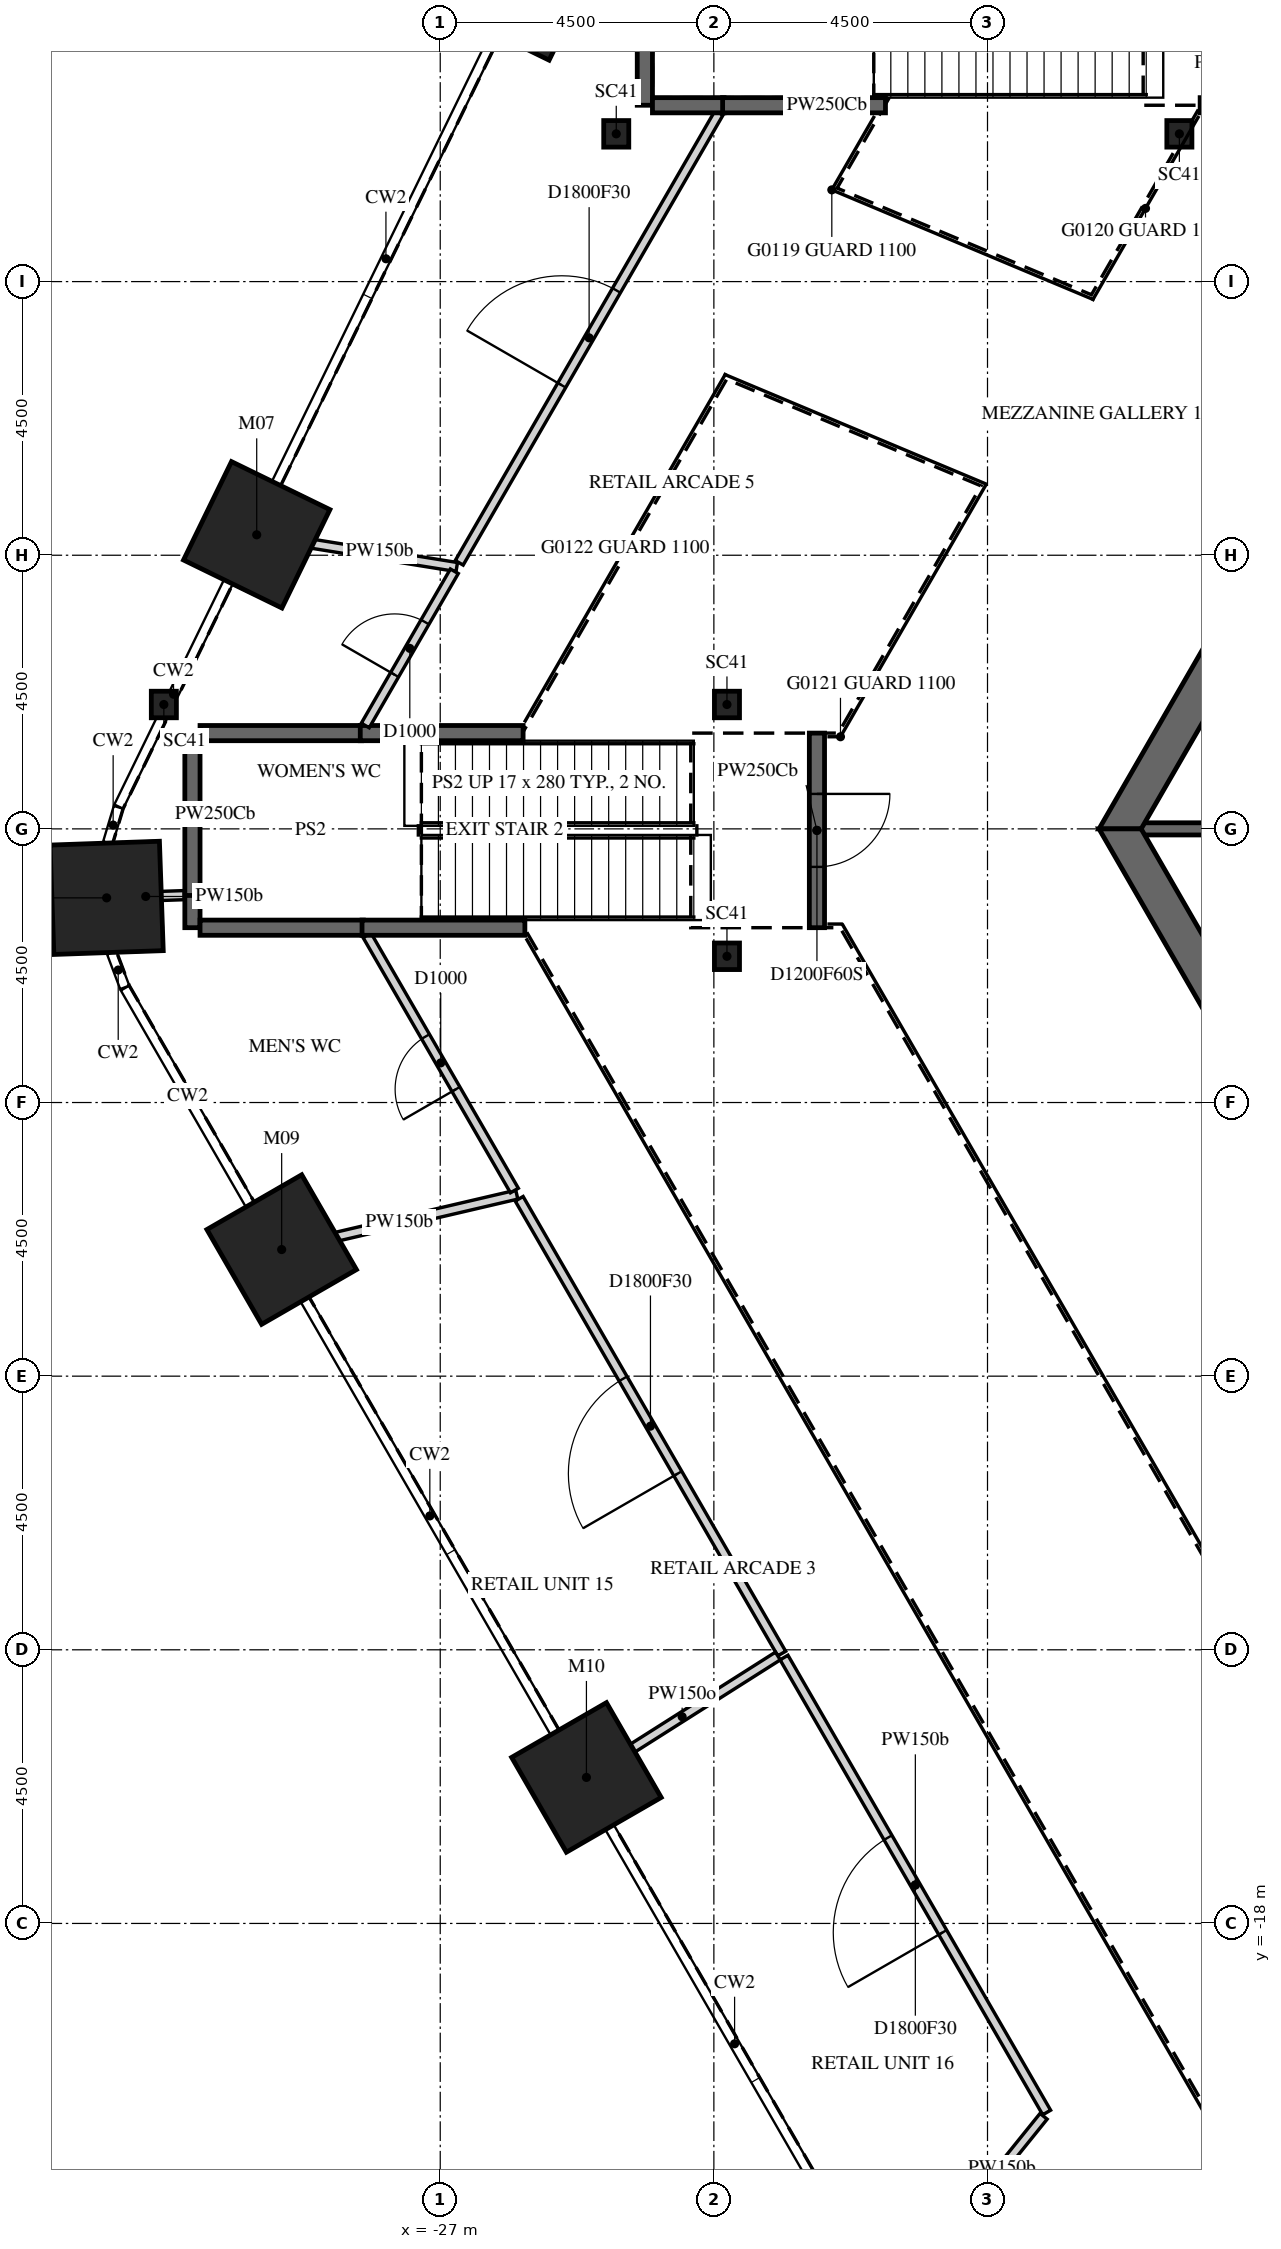
"""IFC4 building model, lengths in metres.
Left out: names, types, materials, properties, quantities, classifications, styles, units other than length and angle.
Written with IfcOpenShell. Run it as: python <this file> out.ifc"""

import sys

from ifc_helpers import new_model, si_unit, direction, frame, frame_2d, origin, origin_2d, place, context, subcontext, project, spatial, polyline, rectangle, i_section, outline, extrude, element, fill, save


model = new_model("IFC4")
c1 = context("Model", 3, precision=1e-05, world=origin(), true_north=direction((0.0, 1.0)))
c2 = subcontext(c1, "Body", "Model", "MODEL_VIEW")
j1 = project(units=[si_unit("LENGTHUNIT", "METRE"), si_unit("PLANEANGLEUNIT", "RADIAN")], contexts=[c1])
p1 = place(None, origin())
s1 = spatial("IfcSite", under=j1, at=p1, CompositionType="ELEMENT")
p2 = place(p1, origin())
s2 = spatial("IfcBuilding", under=s1, at=p2, CompositionType="ELEMENT")
p3 = place(p2, frame((0.0, 0.0, 9.0)))
s3 = spatial("IfcBuildingStorey", under=s2, at=p3, CompositionType="ELEMENT", Elevation=9.0)
for number, where, z_axis, x_axis in (
    (1, (-25.624, 13.845, -0.25), (0.0, 0.0, 1.0), (0.438, 0.899, 0.0)),
    (2, (-30.018, 4.836, -0.25), (0.0, 0.0, 1.0), (0.438, 0.899, 0.0)),
    (3, (-32.486, -1.135, -0.25), (0.0, 0.0, 1.0), (-0.035, 0.999, 0.0)),
    (4, (-29.608, -6.918, -0.25), (0.0, 0.0, 1.0), (-0.5, 0.866, 0.0)),
    (5, (-24.596, -15.599, -0.25), (0.0, 0.0, 1.0), (-0.5, 0.866, 0.0)),
):
    element("IfcColumn", number, at=place(p3, frame(where, z_axis=z_axis, x_axis=x_axis)), inside=s3, PredefinedType="COLUMN", context=c2, shape_type="SweptSolid", body=[
        extrude(rectangle(XDim=1.8, YDim=1.8, at=origin_2d()), origin(), (0.0, 0.0, 1.0), 6.0),
    ])
for number, where, z_axis, x_axis in (
    (6, (-31.545, 2.045, -0.25), (0.0, 0.0, 1.0), (1.0, 0.0, 0.0)),
    (7, (-22.285, 2.045, -0.25), (0.0, 0.0, 1.0), (1.0, 0.0, 0.0)),
    (8, (-22.285, -2.095, -0.25), (0.0, 0.0, 1.0), (1.0, 0.0, 0.0)),
    (9, (-24.105, 11.43, -0.25), (0.0, 0.0, 1.0), (1.0, 0.0, 0.0)),
    (10, (-14.845, 11.43, -0.25), (0.0, 0.0, 1.0), (1.0, 0.0, 0.0)),
):
    element("IfcColumn", number, at=place(p3, frame(where, z_axis=z_axis, x_axis=x_axis)), inside=s3, PredefinedType="COLUMN", context=c2, shape_type="SweptSolid", body=[
        extrude(i_section(OverallWidth=0.412, OverallDepth=0.437, WebThickness=0.036, FlangeThickness=0.058, FilletRadius=0.015, at=origin_2d()), origin(), (0.0, 0.0, 1.0), 6.0),
    ])
p4 = place(p3, frame((-7.91, 13.7, -0.25), z_axis=(0.0, 0.0, 1.0), x_axis=(-0.499999880136, -0.866025472988, 0.0)))
e11 = element("IfcWall", 11, at=p4, inside=s3, PredefinedType="SHEAR", context=c2, shape_type="SweptSolid", body=[
    extrude(outline(polyline([(-0.173, -0.3), (15.993, -0.3), (15.646, 0.3), (0.173, 0.3), (-0.173, -0.3)])), origin(), (0.0, 0.0, 1.0), 6.0),
])
p5 = place(p4, frame((7.039, 0.0, 0.25)))
e12 = element("IfcOpeningElement", 12, at=p5, cuts=e11, PredefinedType="OPENING", context=c2, shape_type="SweptSolid", body=[
    extrude(rectangle(XDim=1.8, YDim=2.4, at=frame_2d((0.9, 1.2))), frame((0.0, 0.31, 0.0), z_axis=(0.0, -1.0, 0.0), x_axis=(1.0, 0.0, 0.0)), (0.0, 0.0, 1.0), 0.62),
])
p6 = place(p3, frame((-15.819, 0.0, -0.25), z_axis=(0.0, 0.0, 1.0), x_axis=(0.499999880136, -0.866025472988, 0.0)))
e13 = element("IfcWall", 13, at=p6, inside=s3, PredefinedType="SHEAR", context=c2, shape_type="SweptSolid", body=[
    extrude(outline(polyline([(-0.173, -0.3), (15.993, -0.3), (15.646, 0.3), (0.173, 0.3), (-0.173, -0.3)])), origin(), (0.0, 0.0, 1.0), 6.0),
])
p7 = place(p6, frame((6.981, 0.0, 0.25)))
e14 = element("IfcOpeningElement", 14, at=p7, cuts=e13, PredefinedType="OPENING", context=c2, shape_type="SweptSolid", body=[
    extrude(rectangle(XDim=1.8, YDim=2.4, at=frame_2d((0.9, 1.2))), frame((0.0, 0.31, 0.0), z_axis=(0.0, -1.0, 0.0), x_axis=(1.0, 0.0, 0.0)), (0.0, 0.0, 1.0), 0.62),
])
p8 = place(p3, frame((-11.547, 0.0, -0.25), z_axis=(0.0, 0.0, 1.0), x_axis=(-1.0, 0.0, 0.0)))
e15 = element("IfcWall", 15, at=p8, inside=s3, PredefinedType="SHEAR", context=c2, shape_type="SweptSolid", body=[
    extrude(rectangle(XDim=3.926, YDim=0.2, at=frame_2d((1.963, 0.0))), origin(), (0.0, 0.0, 1.0), 6.0),
])
p9 = place(p3, frame((-32.486, -1.134, 0.0), z_axis=(0.0, 0.0, 1.0), x_axis=(0.99939717978, 0.034717100209, 0.0)))
e16 = element("IfcWall", 16, at=p9, inside=s3, PredefinedType="PARTITIONING", context=c2, shape_type="SweptSolid", body=[
    extrude(rectangle(XDim=1.287, YDim=0.15, at=frame_2d((0.644, 0.0))), origin(), (0.0, 0.0, 1.0), 5.75),
])
p10 = place(p3, frame((-31.075, -1.625, 0.0), z_axis=(0.0, 0.0, 1.0), x_axis=(0.0, 1.0, 0.0)))
e17 = element("IfcWall", 17, at=p10, inside=s3, PredefinedType="PARTITIONING", context=c2, shape_type="SweptSolid", body=[
    extrude(rectangle(XDim=0.55, YDim=0.25, at=frame_2d((0.275, 0.0))), origin(), (0.0, 0.0, 1.0), 5.75),
])
p11 = place(p3, frame((-31.075, -1.095, 0.0), z_axis=(0.0, 0.0, 1.0), x_axis=(0.0, 1.0, 0.0)))
e18 = element("IfcWall", 18, at=p11, inside=s3, PredefinedType="PARTITIONING", context=c2, shape_type="SweptSolid", body=[
    extrude(rectangle(XDim=2.67, YDim=0.25, at=frame_2d((1.335, 0.0))), origin(), (0.0, 0.0, 1.0), 5.75),
])
p12 = place(p3, frame((-30.95, 1.575, 0.0), z_axis=(0.0, 0.0, 1.0), x_axis=(1.0, 0.0, 0.0)))
e19 = element("IfcWall", 19, at=p12, inside=s3, PredefinedType="PARTITIONING", context=c2, shape_type="SweptSolid", body=[
    extrude(rectangle(XDim=2.657, YDim=0.25, at=frame_2d((1.329, 0.0))), origin(), (0.0, 0.0, 1.0), 5.75),
])
p13 = place(p3, frame((-30.018, 4.836, 0.0), z_axis=(0.0, 0.0, 1.0), x_axis=(0.987270453079, -0.159050471478, 0.0)))
e20 = element("IfcWall", 20, at=p13, inside=s3, PredefinedType="PARTITIONING", context=c2, shape_type="SweptSolid", body=[
    extrude(rectangle(XDim=3.333, YDim=0.15, at=frame_2d((1.666, 0.0))), origin(), (0.0, 0.0, 1.0), 5.75),
])
p14 = place(p3, frame((-29.608, -6.918, 0.0), z_axis=(0.0, 0.0, 1.0), x_axis=(0.97379720247, 0.227418135737, 0.0)))
e21 = element("IfcWall", 21, at=p14, inside=s3, PredefinedType="PARTITIONING", context=c2, shape_type="SweptSolid", body=[
    extrude(rectangle(XDim=3.971, YDim=0.15, at=frame_2d((1.985, 0.0))), origin(), (0.0, 0.0, 1.0), 5.75),
])
p15 = place(p3, frame((-28.315, 1.575, 0.0), z_axis=(0.0, 0.0, 1.0), x_axis=(1.0, 0.0, 0.0)))
e22 = element("IfcWall", 22, at=p15, inside=s3, PredefinedType="PARTITIONING", context=c2, shape_type="SweptSolid", body=[
    extrude(rectangle(XDim=2.678, YDim=0.25, at=frame_2d((1.339, 0.0))), origin(), (0.0, 0.0, 1.0), 5.75),
])
p16 = place(p3, frame((-25.78, -5.947, 0.0), z_axis=(0.0, 0.0, 1.0), x_axis=(-0.500066928074, 0.865986759395, 0.0)))
e23 = element("IfcWall", 23, at=p16, inside=s3, PredefinedType="PARTITIONING", context=c2, shape_type="SweptSolid", body=[
    extrude(rectangle(XDim=4.846, YDim=0.15, at=frame_2d((2.423, 0.0))), origin(), (0.0, 0.0, 1.0), 5.75),
])
p17 = place(p16, frame((1.923, 0.0, 0.0)))
e24 = element("IfcOpeningElement", 24, at=p17, cuts=e23, PredefinedType="OPENING", context=c2, shape_type="SweptSolid", body=[
    extrude(rectangle(XDim=1.0, YDim=2.1, at=frame_2d((0.5, 1.05))), frame((0.0, 0.085, 0.0), z_axis=(0.0, -1.0, 0.0), x_axis=(1.0, 0.0, 0.0)), (0.0, 0.0, 1.0), 0.17),
])
p18 = place(p3, frame((-28.264, -1.625, 0.0), z_axis=(0.0, 0.0, 1.0), x_axis=(-1.0, 0.0, 0.0)))
e25 = element("IfcWall", 25, at=p18, inside=s3, PredefinedType="PARTITIONING", context=c2, shape_type="SweptSolid", body=[
    extrude(rectangle(XDim=2.686, YDim=0.25, at=frame_2d((1.343, 0.0))), origin(), (0.0, 0.0, 1.0), 5.75),
])
p19 = place(p3, frame((-28.233, 1.7, 0.0), z_axis=(0.0, 0.0, 1.0), x_axis=(0.500083180475, 0.865977374189, 0.0)))
e26 = element("IfcWall", 26, at=p19, inside=s3, PredefinedType="PARTITIONING", context=c2, shape_type="SweptSolid", body=[
    extrude(rectangle(XDim=2.929, YDim=0.15, at=frame_2d((1.465, 0.0))), origin(), (0.0, 0.0, 1.0), 5.75),
])
p20 = place(p19, frame((0.965, 0.0, 0.0)))
e27 = element("IfcOpeningElement", 27, at=p20, cuts=e26, PredefinedType="OPENING", context=c2, shape_type="SweptSolid", body=[
    extrude(rectangle(XDim=1.0, YDim=2.1, at=frame_2d((0.5, 1.05))), frame((0.0, 0.085, 0.0), z_axis=(0.0, -1.0, 0.0), x_axis=(1.0, 0.0, 0.0)), (0.0, 0.0, 1.0), 0.17),
])
p21 = place(p3, frame((-21.384, -13.562, 0.0), z_axis=(0.0, 0.0, 1.0), x_axis=(-0.499976136806, 0.866039180768, 0.0)))
e28 = element("IfcWall", 28, at=p21, inside=s3, PredefinedType="PARTITIONING", context=c2, shape_type="SweptSolid", body=[
    extrude(rectangle(XDim=8.636, YDim=0.15, at=frame_2d((4.318, 0.0))), origin(), (0.0, 0.0, 1.0), 5.75),
])
p22 = place(p21, frame((3.418, 0.0, 0.0)))
e29 = element("IfcOpeningElement", 29, at=p22, cuts=e28, PredefinedType="OPENING", context=c2, shape_type="SweptSolid", body=[
    extrude(rectangle(XDim=1.8, YDim=2.1, at=frame_2d((0.9, 1.05))), frame((0.0, 0.085, 0.0), z_axis=(0.0, -1.0, 0.0), x_axis=(1.0, 0.0, 0.0)), (0.0, 0.0, 1.0), 0.17),
])
p23 = place(p3, frame((-25.608, -1.625, 0.0), z_axis=(0.0, 0.0, 1.0), x_axis=(-1.0, 0.0, 0.0)))
e30 = element("IfcWall", 30, at=p23, inside=s3, PredefinedType="PARTITIONING", context=c2, shape_type="SweptSolid", body=[
    extrude(rectangle(XDim=2.678, YDim=0.25, at=frame_2d((1.339, 0.0))), origin(), (0.0, 0.0, 1.0), 5.75),
])
p24 = place(p3, frame((-24.596, -15.599, 0.0), z_axis=(0.0, 0.0, 1.0), x_axis=(0.84447751604, 0.535591005249, 0.0)))
e31 = element("IfcWall", 31, at=p24, inside=s3, PredefinedType="PARTITIONING", context=c2, shape_type="SweptSolid", body=[
    extrude(rectangle(XDim=3.728, YDim=0.15, at=frame_2d((1.864, 0.0))), origin(), (0.0, 0.0, 1.0), 4.996),
])
p25 = place(p3, frame((-23.635, 11.9, 0.0), z_axis=(0.0, 0.0, 1.0), x_axis=(0.0, 1.0, 0.0)))
e32 = element("IfcWall", 32, at=p25, inside=s3, PredefinedType="PARTITIONING", context=c2, shape_type="SweptSolid", body=[
    extrude(rectangle(XDim=3.2, YDim=0.25, at=frame_2d((1.6, 0.0))), origin(), (0.0, 0.0, 1.0), 5.75),
])
p26 = place(p3, frame((-26.688, 4.375, 0.0), z_axis=(0.0, 0.0, 1.0), x_axis=(0.500057174496, 0.865992391557, 0.0)))
e33 = element("IfcWall", 33, at=p26, inside=s3, PredefinedType="PARTITIONING", context=c2, shape_type="SweptSolid", body=[
    extrude(rectangle(XDim=8.544, YDim=0.15, at=frame_2d((4.272, 0.0))), origin(), (0.0, 0.0, 1.0), 5.75),
])
p27 = place(p26, frame((3.372, 0.0, 0.0)))
e34 = element("IfcOpeningElement", 34, at=p27, cuts=e33, PredefinedType="OPENING", context=c2, shape_type="SweptSolid", body=[
    extrude(rectangle(XDim=1.8, YDim=2.1, at=frame_2d((0.9, 1.05))), frame((0.0, 0.085, 0.0), z_axis=(0.0, -1.0, 0.0), x_axis=(1.0, 0.0, 0.0)), (0.0, 0.0, 1.0), 0.17),
])
p28 = place(p3, frame((-22.333, 11.9, 0.0), z_axis=(0.0, 0.0, 1.0), x_axis=(-1.0, 0.0, 0.0)))
e35 = element("IfcWall", 35, at=p28, inside=s3, PredefinedType="PARTITIONING", context=c2, shape_type="SweptSolid", body=[
    extrude(rectangle(XDim=1.177, YDim=0.25, at=frame_2d((0.588, 0.0))), origin(), (0.0, 0.0, 1.0), 5.75),
])
p29 = place(p3, frame((-17.027, -21.109, 0.0), z_axis=(0.0, 0.0, 1.0), x_axis=(-0.499968708895, 0.866043468958, 0.0)))
e36 = element("IfcWall", 36, at=p29, inside=s3, PredefinedType="PARTITIONING", context=c2, shape_type="SweptSolid", body=[
    extrude(rectangle(XDim=8.639, YDim=0.15, at=frame_2d((4.32, 0.0))), origin(), (0.0, 0.0, 1.0), 5.75),
])
p30 = place(p29, frame((3.42, 0.0, 0.0)))
e37 = element("IfcOpeningElement", 37, at=p30, cuts=e36, PredefinedType="OPENING", context=c2, shape_type="SweptSolid", body=[
    extrude(rectangle(XDim=1.8, YDim=2.1, at=frame_2d((0.9, 1.05))), frame((0.0, 0.085, 0.0), z_axis=(0.0, -1.0, 0.0), x_axis=(1.0, 0.0, 0.0)), (0.0, 0.0, 1.0), 0.17),
])
p31 = place(p3, frame((-20.805, 1.575, 0.0), z_axis=(0.0, 0.0, 1.0), x_axis=(0.0, -1.0, 0.0)))
e38 = element("IfcWall", 38, at=p31, inside=s3, PredefinedType="PARTITIONING", context=c2, shape_type="SweptSolid", body=[
    extrude(rectangle(XDim=3.2, YDim=0.25, at=frame_2d((1.6, 0.0))), origin(), (0.0, 0.0, 1.0), 5.75),
])
p32 = place(p31, frame((1.0, 0.0, 0.0)))
e39 = element("IfcOpeningElement", 39, at=p32, cuts=e38, PredefinedType="OPENING", context=c2, shape_type="SweptSolid", body=[
    extrude(rectangle(XDim=1.2, YDim=2.1, at=frame_2d((0.6, 1.05))), frame((0.0, 0.135, 0.0), z_axis=(0.0, -1.0, 0.0), x_axis=(1.0, 0.0, 0.0)), (0.0, 0.0, 1.0), 0.27),
])
p33 = place(p3, frame((-19.678, 11.9, 0.0), z_axis=(0.0, 0.0, 1.0), x_axis=(-1.0, 0.0, 0.0)))
e40 = element("IfcWall", 40, at=p33, inside=s3, PredefinedType="PARTITIONING", context=c2, shape_type="SweptSolid", body=[
    extrude(rectangle(XDim=2.678, YDim=0.25, at=frame_2d((1.339, 0.0))), origin(), (0.0, 0.0, 1.0), 5.75),
])
p34 = place(p3, frame((-17.077, -21.172, 0.0), z_axis=(0.0, 0.0, 1.0), x_axis=(-0.627993102959, -0.778218904059, 0.0)))
e41 = element("IfcWall", 41, at=p34, inside=s3, PredefinedType="PARTITIONING", context=c2, shape_type="SweptSolid", body=[
    extrude(rectangle(XDim=2.181, YDim=0.15, at=frame_2d((1.09, 0.0))), origin(), (0.0, 0.0, 1.0), 5.75),
])
p35 = place(p3, frame((-13.365, 11.9, 0.0), z_axis=(0.0, 0.0, 1.0), x_axis=(-1.0, 0.0, 0.0)))
e42 = element("IfcWall", 42, at=p35, inside=s3, PredefinedType="PARTITIONING", context=c2, shape_type="SweptSolid", body=[
    extrude(rectangle(XDim=1.138, YDim=0.25, at=frame_2d((0.569, 0.0))), origin(), (0.0, 0.0, 1.0), 5.297),
])
p36 = place(p17, origin())
e43 = element("IfcDoor", 43, at=p36, inside=s3, OperationType="SINGLE_SWING_RIGHT", PredefinedType="DOOR", context=c2, shape_type="SweptSolid", body=[
    extrude(rectangle(XDim=1.0, YDim=2.1, at=frame_2d((0.5, 1.05))), frame((0.0, 0.025, 0.0), z_axis=(0.0, -1.0, 0.0), x_axis=(1.0, 0.0, 0.0)), (0.0, 0.0, 1.0), 0.05),
])
fill(e24, e43)
p37 = place(p20, origin())
e44 = element("IfcDoor", 44, at=p37, inside=s3, OperationType="SINGLE_SWING_LEFT", PredefinedType="DOOR", context=c2, shape_type="SweptSolid", body=[
    extrude(rectangle(XDim=1.0, YDim=2.1, at=frame_2d((0.5, 1.05))), frame((0.0, 0.025, 0.0), z_axis=(0.0, -1.0, 0.0), x_axis=(1.0, 0.0, 0.0)), (0.0, 0.0, 1.0), 0.05),
])
fill(e27, e44)
p38 = place(p22, origin())
e45 = element("IfcDoor", 45, at=p38, inside=s3, OperationType="DOUBLE_DOOR_SINGLE_SWING", PredefinedType="DOOR", context=c2, shape_type="SweptSolid", body=[
    extrude(rectangle(XDim=1.8, YDim=2.1, at=frame_2d((0.9, 1.05))), frame((0.0, 0.025, 0.0), z_axis=(0.0, -1.0, 0.0), x_axis=(1.0, 0.0, 0.0)), (0.0, 0.0, 1.0), 0.05),
])
fill(e29, e45)
p39 = place(p27, origin())
e46 = element("IfcDoor", 46, at=p39, inside=s3, OperationType="DOUBLE_DOOR_SINGLE_SWING", PredefinedType="DOOR", context=c2, shape_type="SweptSolid", body=[
    extrude(rectangle(XDim=1.8, YDim=2.1, at=frame_2d((0.9, 1.05))), frame((0.0, 0.025, 0.0), z_axis=(0.0, -1.0, 0.0), x_axis=(1.0, 0.0, 0.0)), (0.0, 0.0, 1.0), 0.05),
])
fill(e34, e46)
p40 = place(p30, origin())
e47 = element("IfcDoor", 47, at=p40, inside=s3, OperationType="DOUBLE_DOOR_SINGLE_SWING", PredefinedType="DOOR", context=c2, shape_type="SweptSolid", body=[
    extrude(rectangle(XDim=1.8, YDim=2.1, at=frame_2d((0.9, 1.05))), frame((0.0, 0.025, 0.0), z_axis=(0.0, -1.0, 0.0), x_axis=(1.0, 0.0, 0.0)), (0.0, 0.0, 1.0), 0.05),
])
fill(e37, e47)
p41 = place(p32, origin())
e48 = element("IfcDoor", 48, at=p41, inside=s3, OperationType="SINGLE_SWING_LEFT", PredefinedType="DOOR", context=c2, shape_type="SweptSolid", body=[
    extrude(rectangle(XDim=1.2, YDim=2.1, at=frame_2d((0.6, 1.05))), frame((0.0, 0.025, 0.0), z_axis=(0.0, -1.0, 0.0), x_axis=(1.0, 0.0, 0.0)), (0.0, 0.0, 1.0), 0.05),
])
fill(e39, e48)
save(model, sys.argv[1])
